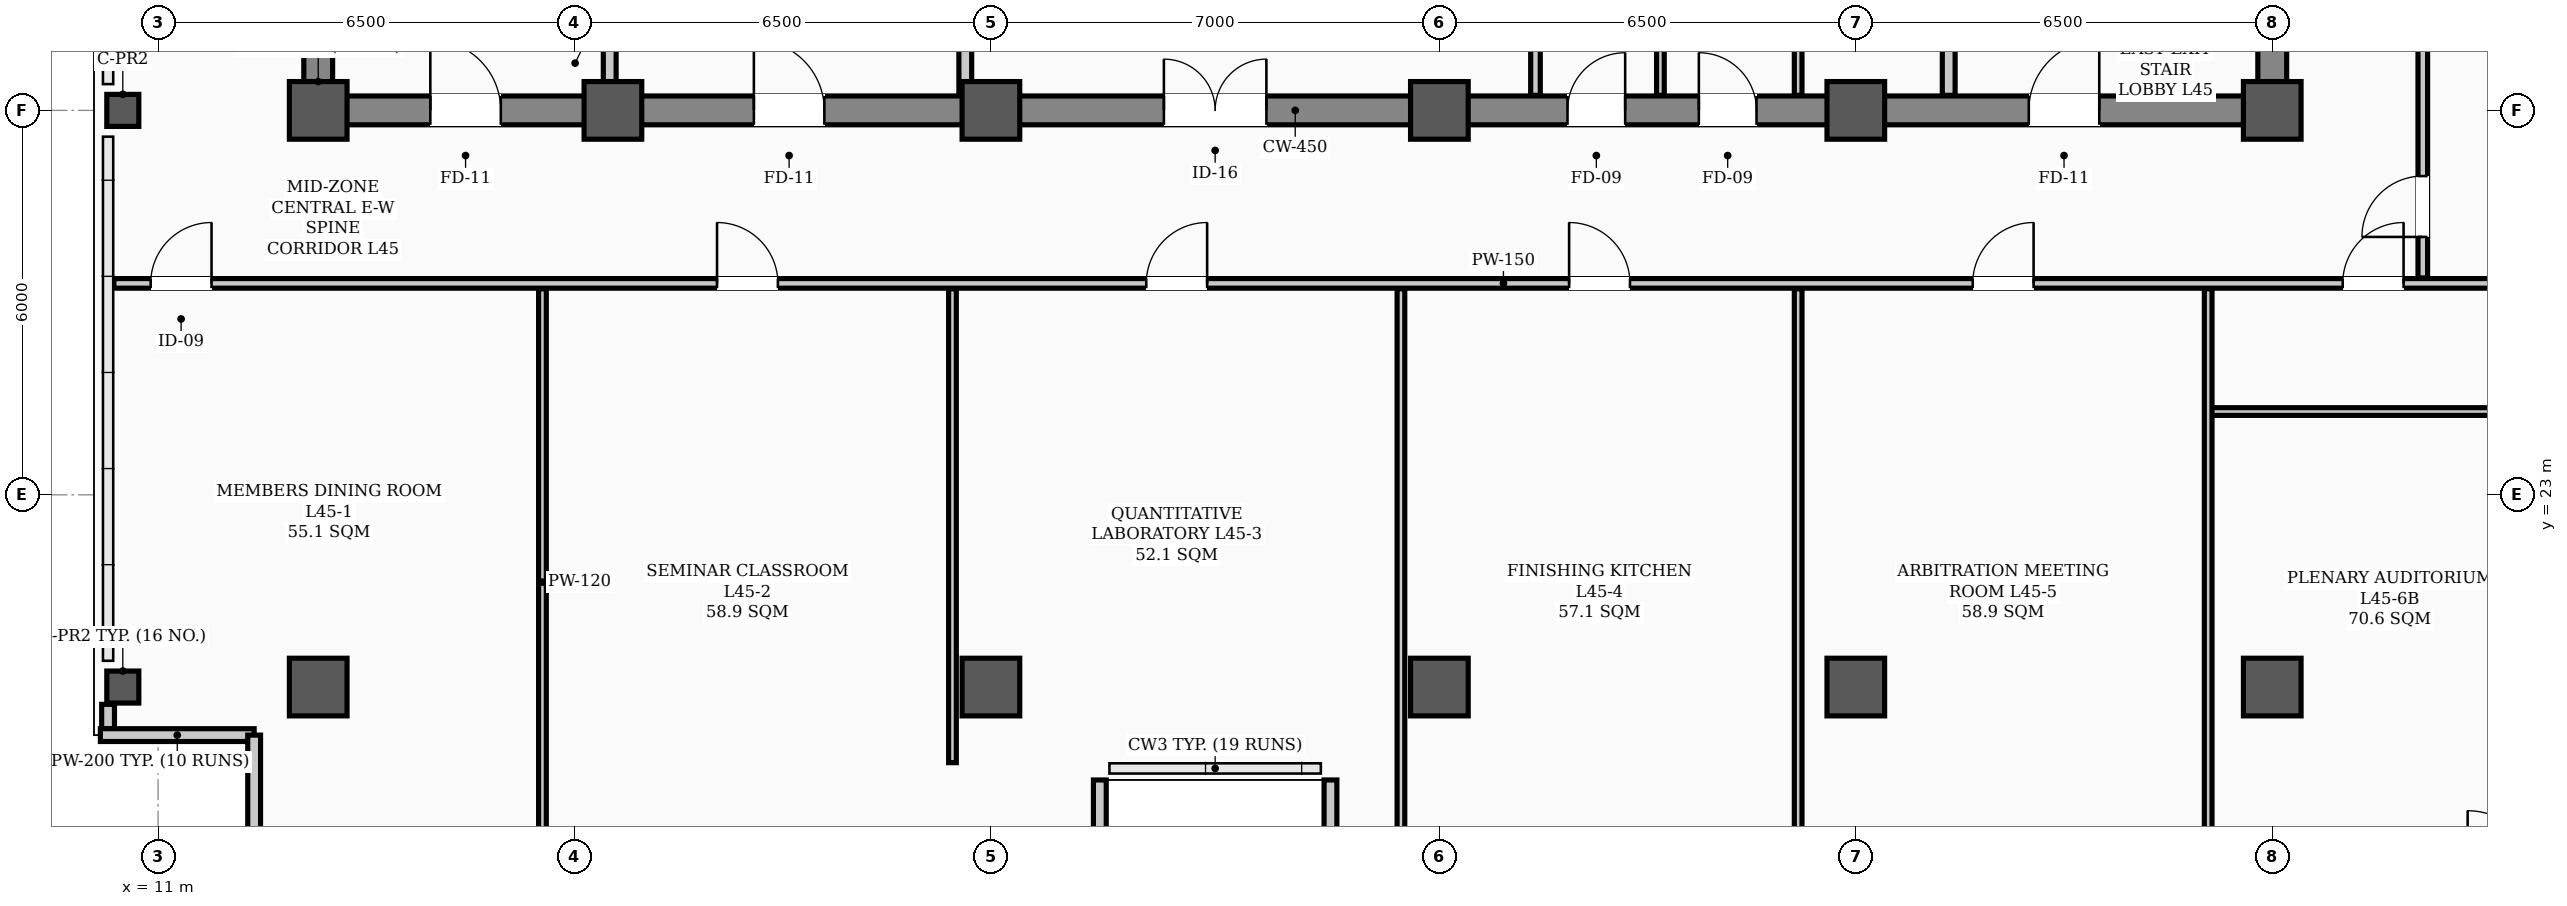
"""IFC4 building model, lengths in metres.
Left out: names, types, materials, properties, quantities, classifications, styles, units other than length and angle.
Written with IfcOpenShell. Run it as: python <this file> out.ifc"""

import sys

from ifc_helpers import new_model, si_unit, direction, frame, frame_2d, origin, origin_2d, place, context, subcontext, project, spatial, rectangle, hollow_rectangle, extrude, element, fill, save


model = new_model("IFC4")
c1 = context("Model", 3, precision=1e-05, world=origin(), true_north=direction((0.0, 1.0)))
c2 = subcontext(c1, "Body", "Model", "MODEL_VIEW")
j1 = project(units=[si_unit("LENGTHUNIT", "METRE"), si_unit("PLANEANGLEUNIT", "RADIAN")], contexts=[c1])
p1 = place(None, origin())
s1 = spatial("IfcSite", under=j1, at=p1, CompositionType="ELEMENT")
p2 = place(p1, origin())
s2 = spatial("IfcBuilding", under=s1, at=p2, CompositionType="ELEMENT")
p3 = place(p2, frame((0.0, 0.0, 181.2)))
s3 = spatial("IfcBuildingStorey", under=s2, at=p3, CompositionType="ELEMENT", Elevation=181.2)
for number, where, z_axis, x_axis in (
    (1, (13.5, 29.0, 0.0), (0.0, 0.0, 1.0), (1.0, 0.0, 0.0)),
    (2, (18.1, 29.0, 0.0), (0.0, 0.0, 1.0), (1.0, 0.0, 0.0)),
    (3, (24.0, 29.0, 0.0), (0.0, 0.0, 1.0), (1.0, 0.0, 0.0)),
    (4, (31.0, 29.0, 0.0), (0.0, 0.0, 1.0), (1.0, 0.0, 0.0)),
    (5, (37.5, 29.0, 0.0), (0.0, 0.0, 1.0), (1.0, 0.0, 0.0)),
    (6, (44.0, 29.0, 0.0), (0.0, 0.0, 1.0), (1.0, 0.0, 0.0)),
    (7, (13.5, 20.0, 0.0), (0.0, 0.0, 1.0), (1.0, 0.0, 0.0)),
    (8, (24.0, 20.0, 0.0), (0.0, 0.0, 1.0), (1.0, 0.0, 0.0)),
    (9, (31.0, 20.0, 0.0), (0.0, 0.0, 1.0), (1.0, 0.0, 0.0)),
    (10, (37.5, 20.0, 0.0), (0.0, 0.0, 1.0), (1.0, 0.0, 0.0)),
    (11, (44.0, 20.0, 0.0), (0.0, 0.0, 1.0), (1.0, 0.0, 0.0)),
):
    element("IfcColumn", number, at=place(p3, frame(where, z_axis=z_axis, x_axis=x_axis)), inside=s3, PredefinedType="COLUMN", context=c2, shape_type="SweptSolid", body=[
        extrude(hollow_rectangle(XDim=0.9, YDim=0.9, WallThickness=0.035, InnerFilletRadius=0.017, OuterFilletRadius=0.052, at=origin_2d()), origin(), (0.0, 0.0, 1.0), 3.9),
    ])
for number, where, z_axis, x_axis in (
    (12, (10.45, 20.0, 0.0), (0.0, 0.0, 1.0), (1.0, 0.0, 0.0)),
    (13, (10.45, 29.0, 0.0), (0.0, 0.0, 1.0), (1.0, 0.0, 0.0)),
):
    element("IfcColumn", number, at=place(p3, frame(where, z_axis=z_axis, x_axis=x_axis)), inside=s3, PredefinedType="COLUMN", context=c2, shape_type="SweptSolid", body=[
        extrude(hollow_rectangle(XDim=0.5, YDim=0.5, WallThickness=0.024, InnerFilletRadius=0.012, OuterFilletRadius=0.036, at=origin_2d()), origin(), (0.0, 0.0, 1.0), 3.9),
    ])
p4 = place(p3, frame((10.22, 19.35, 0.0), z_axis=(0.0, 0.0, 1.0), x_axis=(0.0, 1.0, 0.0)))
e14 = element("IfcWall", 14, at=p4, inside=s3, PredefinedType="PARAPET", context=c2, shape_type="SweptSolid", body=[
    extrude(rectangle(XDim=0.38, YDim=0.2, at=frame_2d((0.19, 0.0))), origin(), (0.0, 0.0, 1.0), 1.2),
])
for number, where, z_axis, x_axis in (
    (15, (10.1, 19.25, 0.0), (0.0, 0.0, 1.0), (1.0, 0.0, 0.0)),
    (16, (12.5, 19.25, 0.0), (0.0, 0.0, 1.0), (0.0, -1.0, 0.0)),
):
    element("IfcWall", number, at=place(p3, frame(where, z_axis=z_axis, x_axis=x_axis)), inside=s3, PredefinedType="PARAPET", context=c2, shape_type="SweptSolid", body=[
        extrude(rectangle(XDim=2.4, YDim=0.2, at=frame_2d((1.2, 0.0))), origin(), (0.0, 0.0, 1.0), 1.2),
    ])
for number, where, z_axis, x_axis in (
    (17, (25.7, 16.85, 0.0), (0.0, 0.0, 1.0), (0.0, 1.0, 0.0)),
    (18, (29.3, 18.55, 0.0), (0.0, 0.0, 1.0), (0.0, -1.0, 0.0)),
):
    element("IfcWall", number, at=place(p3, frame(where, z_axis=z_axis, x_axis=x_axis)), inside=s3, PredefinedType="PARAPET", context=c2, shape_type="SweptSolid", body=[
        extrude(rectangle(XDim=1.7, YDim=0.2, at=frame_2d((0.85, 0.0))), origin(), (0.0, 0.0, 1.0), 1.2),
    ])
p5 = place(p3, frame((13.5, 29.0, 0.0), z_axis=(0.0, 0.0, 1.0), x_axis=(1.0, 0.0, 0.0)))
e19 = element("IfcWall", 19, at=p5, inside=s3, PredefinedType="SHEAR", context=c2, shape_type="SweptSolid", body=[
    extrude(rectangle(XDim=30.5, YDim=0.45, at=frame_2d((15.25, 0.0))), origin(), (0.0, 0.0, 1.0), 3.72),
])
p6 = place(p5, frame((1.75, 0.0, 0.0)))
e20 = element("IfcOpeningElement", 20, at=p6, cuts=e19, PredefinedType="OPENING", context=c2, shape_type="SweptSolid", body=[
    extrude(rectangle(XDim=1.1, YDim=2.08, at=frame_2d((0.55, 1.04))), frame((0.0, 0.235, 0.0), z_axis=(0.0, -1.0, 0.0), x_axis=(1.0, 0.0, 0.0)), (0.0, 0.0, 1.0), 0.47),
])
p7 = place(p5, frame((26.7, 0.0, 0.0)))
e21 = element("IfcOpeningElement", 21, at=p7, cuts=e19, PredefinedType="OPENING", context=c2, shape_type="SweptSolid", body=[
    extrude(rectangle(XDim=1.1, YDim=2.08, at=frame_2d((0.55, 1.04))), frame((0.0, 0.235, 0.0), z_axis=(0.0, -1.0, 0.0), x_axis=(1.0, 0.0, 0.0)), (0.0, 0.0, 1.0), 0.47),
])
p8 = place(p5, frame((6.8, 0.0, 0.0)))
e22 = element("IfcOpeningElement", 22, at=p8, cuts=e19, PredefinedType="OPENING", context=c2, shape_type="SweptSolid", body=[
    extrude(rectangle(XDim=1.1, YDim=2.08, at=frame_2d((0.55, 1.04))), frame((0.0, 0.235, 0.0), z_axis=(0.0, -1.0, 0.0), x_axis=(1.0, 0.0, 0.0)), (0.0, 0.0, 1.0), 0.47),
])
p9 = place(p5, frame((13.2, 0.0, 0.0)))
e23 = element("IfcOpeningElement", 23, at=p9, cuts=e19, PredefinedType="OPENING", context=c2, shape_type="SweptSolid", body=[
    extrude(rectangle(XDim=1.6, YDim=2.08, at=frame_2d((0.8, 1.04))), frame((0.0, 0.235, 0.0), z_axis=(0.0, -1.0, 0.0), x_axis=(1.0, 0.0, 0.0)), (0.0, 0.0, 1.0), 0.47),
])
p10 = place(p5, frame((19.5, 0.0, 0.0)))
e24 = element("IfcOpeningElement", 24, at=p10, cuts=e19, PredefinedType="OPENING", context=c2, shape_type="SweptSolid", body=[
    extrude(rectangle(XDim=0.9, YDim=2.08, at=frame_2d((0.45, 1.04))), frame((0.0, 0.235, 0.0), z_axis=(0.0, -1.0, 0.0), x_axis=(1.0, 0.0, 0.0)), (0.0, 0.0, 1.0), 0.47),
])
p11 = place(p5, frame((21.55, 0.0, 0.0)))
e25 = element("IfcOpeningElement", 25, at=p11, cuts=e19, PredefinedType="OPENING", context=c2, shape_type="SweptSolid", body=[
    extrude(rectangle(XDim=0.9, YDim=2.08, at=frame_2d((0.45, 1.04))), frame((0.0, 0.235, 0.0), z_axis=(0.0, -1.0, 0.0), x_axis=(1.0, 0.0, 0.0)), (0.0, 0.0, 1.0), 0.47),
])
for number, where, z_axis, x_axis in (
    (26, (13.5, 29.35, 0.0), (0.0, 0.0, 1.0), (0.0, 1.0, 0.0)),
    (27, (44.0, 29.35, 0.0), (0.0, 0.0, 1.0), (0.0, 1.0, 0.0)),
):
    element("IfcWall", number, at=place(p3, frame(where, z_axis=z_axis, x_axis=x_axis)), inside=s3, PredefinedType="SHEAR", context=c2, shape_type="SweptSolid", body=[
        extrude(rectangle(XDim=8.6, YDim=0.45, at=frame_2d((4.3, 0.0))), origin(), (0.0, 0.0, 1.0), 3.72),
    ])
p12 = place(p3, frame((10.31, 26.3, 0.0), z_axis=(0.0, 0.0, 1.0), x_axis=(1.0, 0.0, 0.0)))
e28 = element("IfcWall", 28, at=p12, inside=s3, PredefinedType="PARTITIONING", context=c2, shape_type="SweptSolid", body=[
    extrude(rectangle(XDim=43.38, YDim=0.15, at=frame_2d((21.69, 0.0))), origin(), (0.0, 0.0, 1.0), 3.2),
])
p13 = place(p12, frame((0.575, 0.0, 0.0)))
e29 = element("IfcOpeningElement", 29, at=p13, cuts=e28, PredefinedType="OPENING", context=c2, shape_type="SweptSolid", body=[
    extrude(rectangle(XDim=0.95, YDim=2.08, at=frame_2d((0.475, 1.04))), frame((0.0, 0.085, 0.0), z_axis=(0.0, -1.0, 0.0), x_axis=(1.0, 0.0, 0.0)), (0.0, 0.0, 1.0), 0.17),
])
p14 = place(p12, frame((9.415, 0.0, 0.0)))
e30 = element("IfcOpeningElement", 30, at=p14, cuts=e28, PredefinedType="OPENING", context=c2, shape_type="SweptSolid", body=[
    extrude(rectangle(XDim=0.95, YDim=2.08, at=frame_2d((0.475, 1.04))), frame((0.0, 0.085, 0.0), z_axis=(0.0, -1.0, 0.0), x_axis=(1.0, 0.0, 0.0)), (0.0, 0.0, 1.0), 0.17),
])
p15 = place(p12, frame((16.115, 0.0, 0.0)))
e31 = element("IfcOpeningElement", 31, at=p15, cuts=e28, PredefinedType="OPENING", context=c2, shape_type="SweptSolid", body=[
    extrude(rectangle(XDim=0.95, YDim=2.08, at=frame_2d((0.475, 1.04))), frame((0.0, 0.085, 0.0), z_axis=(0.0, -1.0, 0.0), x_axis=(1.0, 0.0, 0.0)), (0.0, 0.0, 1.0), 0.17),
])
p16 = place(p12, frame((22.715, 0.0, 0.0)))
e32 = element("IfcOpeningElement", 32, at=p16, cuts=e28, PredefinedType="OPENING", context=c2, shape_type="SweptSolid", body=[
    extrude(rectangle(XDim=0.95, YDim=2.08, at=frame_2d((0.475, 1.04))), frame((0.0, 0.085, 0.0), z_axis=(0.0, -1.0, 0.0), x_axis=(1.0, 0.0, 0.0)), (0.0, 0.0, 1.0), 0.17),
])
p17 = place(p12, frame((29.015, 0.0, 0.0)))
e33 = element("IfcOpeningElement", 33, at=p17, cuts=e28, PredefinedType="OPENING", context=c2, shape_type="SweptSolid", body=[
    extrude(rectangle(XDim=0.95, YDim=2.08, at=frame_2d((0.475, 1.04))), frame((0.0, 0.085, 0.0), z_axis=(0.0, -1.0, 0.0), x_axis=(1.0, 0.0, 0.0)), (0.0, 0.0, 1.0), 0.17),
])
p18 = place(p12, frame((34.79, 0.0, 0.0)))
e34 = element("IfcOpeningElement", 34, at=p18, cuts=e28, PredefinedType="OPENING", context=c2, shape_type="SweptSolid", body=[
    extrude(rectangle(XDim=0.95, YDim=2.08, at=frame_2d((0.475, 1.04))), frame((0.0, 0.085, 0.0), z_axis=(0.0, -1.0, 0.0), x_axis=(1.0, 0.0, 0.0)), (0.0, 0.0, 1.0), 0.17),
])
p19 = place(p3, frame((43.0, 24.3, 0.0), z_axis=(0.0, 0.0, 1.0), x_axis=(1.0, 0.0, 0.0)))
e35 = element("IfcWall", 35, at=p19, inside=s3, PredefinedType="PARTITIONING", context=c2, shape_type="SweptSolid", body=[
    extrude(rectangle(XDim=10.69, YDim=0.12, at=frame_2d((5.345, 0.0))), origin(), (0.0, 0.0, 1.0), 3.2),
])
p20 = place(p19, frame((4.87, 0.0, 0.0)))
e36 = element("IfcOpeningElement", 36, at=p20, cuts=e35, PredefinedType="OPENING", context=c2, shape_type="SweptSolid", body=[
    extrude(rectangle(XDim=0.95, YDim=2.08, at=frame_2d((0.475, 1.04))), frame((0.0, 0.07, 0.0), z_axis=(0.0, -1.0, 0.0), x_axis=(1.0, 0.0, 0.0)), (0.0, 0.0, 1.0), 0.14),
])
for number, where, z_axis, x_axis in (
    (37, (18.05, 29.235, 0.0), (0.0, 0.0, 1.0), (0.0, 1.0, 0.0)),
    (38, (38.95, 29.235, 0.0), (0.0, 0.0, 1.0), (0.0, 1.0, 0.0)),
):
    element("IfcWall", number, at=place(p3, frame(where, z_axis=z_axis, x_axis=x_axis)), inside=s3, PredefinedType="STANDARD", context=c2, shape_type="SweptSolid", body=[
        extrude(rectangle(XDim=1.065, YDim=0.2, at=frame_2d((0.532, 0.0))), origin(), (0.0, 0.0, 1.0), 3.35),
    ])
p21 = place(p3, frame((23.6, 29.235, 0.0), z_axis=(0.0, 0.0, 1.0), x_axis=(0.0, 1.0, 0.0)))
e39 = element("IfcWall", 39, at=p21, inside=s3, PredefinedType="STANDARD", context=c2, shape_type="SweptSolid", body=[
    extrude(rectangle(XDim=5.465, YDim=0.2, at=frame_2d((2.732, 0.0))), origin(), (0.0, 0.0, 1.0), 3.2),
])
p22 = place(p3, frame((32.5, 29.235, 0.0), z_axis=(0.0, 0.0, 1.0), x_axis=(0.0, 1.0, 0.0)))
e40 = element("IfcWall", 40, at=p22, inside=s3, PredefinedType="PARTITIONING", context=c2, shape_type="SweptSolid", body=[
    extrude(rectangle(XDim=2.53, YDim=0.15, at=frame_2d((1.265, 0.0))), origin(), (0.0, 0.0, 1.0), 3.35),
])
for number, where, z_axis, x_axis in (
    (41, (36.6, 29.235, 0.0), (0.0, 0.0, 1.0), (0.0, 1.0, 0.0)),
    (42, (34.45, 29.235, 0.0), (0.0, 0.0, 1.0), (0.0, 1.0, 0.0)),
):
    element("IfcWall", number, at=place(p3, frame(where, z_axis=z_axis, x_axis=x_axis)), inside=s3, PredefinedType="PARTITIONING", context=c2, shape_type="SweptSolid", body=[
        extrude(rectangle(XDim=2.53, YDim=0.12, at=frame_2d((1.265, 0.0))), origin(), (0.0, 0.0, 1.0), 3.35),
    ])
p23 = place(p3, frame((46.35, 26.385, 0.0), z_axis=(0.0, 0.0, 1.0), x_axis=(0.0, 1.0, 0.0)))
e43 = element("IfcWall", 43, at=p23, inside=s3, PredefinedType="PARTITIONING", context=c2, shape_type="SweptSolid", body=[
    extrude(rectangle(XDim=13.58, YDim=0.15, at=frame_2d((6.79, 0.0))), origin(), (0.0, 0.0, 1.0), 3.1),
])
p24 = place(p23, frame((0.64, 0.0, 0.0)))
e44 = element("IfcOpeningElement", 44, at=p24, cuts=e43, PredefinedType="OPENING", context=c2, shape_type="SweptSolid", body=[
    extrude(rectangle(XDim=0.95, YDim=2.08, at=frame_2d((0.475, 1.04))), frame((0.0, 0.085, 0.0), z_axis=(0.0, -1.0, 0.0), x_axis=(1.0, 0.0, 0.0)), (0.0, 0.0, 1.0), 0.17),
])
p25 = place(p23, frame((10.065, 0.0, 0.0)))
e45 = element("IfcOpeningElement", 45, at=p25, cuts=e43, PredefinedType="OPENING", context=c2, shape_type="SweptSolid", body=[
    extrude(rectangle(XDim=0.95, YDim=2.08, at=frame_2d((0.475, 1.04))), frame((0.0, 0.085, 0.0), z_axis=(0.0, -1.0, 0.0), x_axis=(1.0, 0.0, 0.0)), (0.0, 0.0, 1.0), 0.17),
])
p26 = place(p3, frame((17.0, 17.06, 0.0), z_axis=(0.0, 0.0, 1.0), x_axis=(0.0, 1.0, 0.0)))
e46 = element("IfcWall", 46, at=p26, inside=s3, PredefinedType="PARTITIONING", context=c2, shape_type="SweptSolid", body=[
    extrude(rectangle(XDim=9.155, YDim=0.12, at=frame_2d((4.578, 0.0))), origin(), (0.0, 0.0, 1.0), 3.1),
])
p27 = place(p3, frame((23.4, 18.82, 0.0), z_axis=(0.0, 0.0, 1.0), x_axis=(0.0, 1.0, 0.0)))
e47 = element("IfcWall", 47, at=p27, inside=s3, PredefinedType="PARTITIONING", context=c2, shape_type="SweptSolid", body=[
    extrude(rectangle(XDim=7.395, YDim=0.12, at=frame_2d((3.698, 0.0))), origin(), (0.0, 0.0, 1.0), 3.1),
])
for number, where, z_axis, x_axis in (
    (48, (30.4, 17.06, 0.0), (0.0, 0.0, 1.0), (0.0, 1.0, 0.0)),
    (49, (36.6, 17.06, 0.0), (0.0, 0.0, 1.0), (0.0, 1.0, 0.0)),
    (50, (43.0, 17.06, 0.0), (0.0, 0.0, 1.0), (0.0, 1.0, 0.0)),
):
    element("IfcWall", number, at=place(p3, frame(where, z_axis=z_axis, x_axis=x_axis)), inside=s3, PredefinedType="PARTITIONING", context=c2, shape_type="SweptSolid", body=[
        extrude(rectangle(XDim=9.155, YDim=0.12, at=frame_2d((4.578, 0.0))), origin(), (0.0, 0.0, 1.0), 3.1),
    ])
p28 = place(p6, origin())
e51 = element("IfcDoor", 51, at=p28, inside=s3, OperationType="SINGLE_SWING_LEFT", PredefinedType="DOOR", context=c2, shape_type="SweptSolid", body=[
    extrude(rectangle(XDim=1.1, YDim=2.08, at=frame_2d((0.55, 1.04))), frame((0.0, 0.025, 0.0), z_axis=(0.0, -1.0, 0.0), x_axis=(1.0, 0.0, 0.0)), (0.0, 0.0, 1.0), 0.05),
])
fill(e20, e51)
p29 = place(p7, origin())
e52 = element("IfcDoor", 52, at=p29, inside=s3, OperationType="SINGLE_SWING_RIGHT", PredefinedType="DOOR", context=c2, shape_type="SweptSolid", body=[
    extrude(rectangle(XDim=1.1, YDim=2.08, at=frame_2d((0.55, 1.04))), frame((0.0, 0.025, 0.0), z_axis=(0.0, -1.0, 0.0), x_axis=(1.0, 0.0, 0.0)), (0.0, 0.0, 1.0), 0.05),
])
fill(e21, e52)
p30 = place(p8, origin())
e53 = element("IfcDoor", 53, at=p30, inside=s3, OperationType="SINGLE_SWING_LEFT", PredefinedType="DOOR", context=c2, shape_type="SweptSolid", body=[
    extrude(rectangle(XDim=1.1, YDim=2.08, at=frame_2d((0.55, 1.04))), frame((0.0, 0.025, 0.0), z_axis=(0.0, -1.0, 0.0), x_axis=(1.0, 0.0, 0.0)), (0.0, 0.0, 1.0), 0.05),
])
fill(e22, e53)
p31 = place(p9, origin())
e54 = element("IfcDoor", 54, at=p31, inside=s3, OperationType="DOUBLE_DOOR_SINGLE_SWING", PredefinedType="DOOR", context=c2, shape_type="SweptSolid", body=[
    extrude(rectangle(XDim=1.6, YDim=2.08, at=frame_2d((0.8, 1.04))), frame((0.0, 0.025, 0.0), z_axis=(0.0, -1.0, 0.0), x_axis=(1.0, 0.0, 0.0)), (0.0, 0.0, 1.0), 0.05),
])
fill(e23, e54)
p32 = place(p10, origin())
e55 = element("IfcDoor", 55, at=p32, inside=s3, OperationType="SINGLE_SWING_RIGHT", PredefinedType="DOOR", context=c2, shape_type="SweptSolid", body=[
    extrude(rectangle(XDim=0.9, YDim=2.08, at=frame_2d((0.45, 1.04))), frame((0.0, 0.025, 0.0), z_axis=(0.0, -1.0, 0.0), x_axis=(1.0, 0.0, 0.0)), (0.0, 0.0, 1.0), 0.05),
])
fill(e24, e55)
p33 = place(p11, origin())
e56 = element("IfcDoor", 56, at=p33, inside=s3, OperationType="SINGLE_SWING_LEFT", PredefinedType="DOOR", context=c2, shape_type="SweptSolid", body=[
    extrude(rectangle(XDim=0.9, YDim=2.08, at=frame_2d((0.45, 1.04))), frame((0.0, 0.025, 0.0), z_axis=(0.0, -1.0, 0.0), x_axis=(1.0, 0.0, 0.0)), (0.0, 0.0, 1.0), 0.05),
])
fill(e25, e56)
p34 = place(p13, origin())
e57 = element("IfcDoor", 57, at=p34, inside=s3, OperationType="SINGLE_SWING_RIGHT", PredefinedType="DOOR", context=c2, shape_type="SweptSolid", body=[
    extrude(rectangle(XDim=0.95, YDim=2.08, at=frame_2d((0.475, 1.04))), frame((0.0, 0.025, 0.0), z_axis=(0.0, -1.0, 0.0), x_axis=(1.0, 0.0, 0.0)), (0.0, 0.0, 1.0), 0.05),
])
fill(e29, e57)
p35 = place(p14, origin())
e58 = element("IfcDoor", 58, at=p35, inside=s3, OperationType="SINGLE_SWING_LEFT", PredefinedType="DOOR", context=c2, shape_type="SweptSolid", body=[
    extrude(rectangle(XDim=0.95, YDim=2.08, at=frame_2d((0.475, 1.04))), frame((0.0, 0.025, 0.0), z_axis=(0.0, -1.0, 0.0), x_axis=(1.0, 0.0, 0.0)), (0.0, 0.0, 1.0), 0.05),
])
fill(e30, e58)
p36 = place(p15, origin())
e59 = element("IfcDoor", 59, at=p36, inside=s3, OperationType="SINGLE_SWING_RIGHT", PredefinedType="DOOR", context=c2, shape_type="SweptSolid", body=[
    extrude(rectangle(XDim=0.95, YDim=2.08, at=frame_2d((0.475, 1.04))), frame((0.0, 0.025, 0.0), z_axis=(0.0, -1.0, 0.0), x_axis=(1.0, 0.0, 0.0)), (0.0, 0.0, 1.0), 0.05),
])
fill(e31, e59)
p37 = place(p16, origin())
e60 = element("IfcDoor", 60, at=p37, inside=s3, OperationType="SINGLE_SWING_LEFT", PredefinedType="DOOR", context=c2, shape_type="SweptSolid", body=[
    extrude(rectangle(XDim=0.95, YDim=2.08, at=frame_2d((0.475, 1.04))), frame((0.0, 0.025, 0.0), z_axis=(0.0, -1.0, 0.0), x_axis=(1.0, 0.0, 0.0)), (0.0, 0.0, 1.0), 0.05),
])
fill(e32, e60)
p38 = place(p17, origin())
e61 = element("IfcDoor", 61, at=p38, inside=s3, OperationType="SINGLE_SWING_RIGHT", PredefinedType="DOOR", context=c2, shape_type="SweptSolid", body=[
    extrude(rectangle(XDim=0.95, YDim=2.08, at=frame_2d((0.475, 1.04))), frame((0.0, 0.025, 0.0), z_axis=(0.0, -1.0, 0.0), x_axis=(1.0, 0.0, 0.0)), (0.0, 0.0, 1.0), 0.05),
])
fill(e33, e61)
p39 = place(p18, origin())
e62 = element("IfcDoor", 62, at=p39, inside=s3, OperationType="SINGLE_SWING_RIGHT", PredefinedType="DOOR", context=c2, shape_type="SweptSolid", body=[
    extrude(rectangle(XDim=0.95, YDim=2.08, at=frame_2d((0.475, 1.04))), frame((0.0, 0.025, 0.0), z_axis=(0.0, -1.0, 0.0), x_axis=(1.0, 0.0, 0.0)), (0.0, 0.0, 1.0), 0.05),
])
fill(e34, e62)
p40 = place(p24, origin())
e63 = element("IfcDoor", 63, at=p40, inside=s3, OperationType="SINGLE_SWING_LEFT", PredefinedType="DOOR", context=c2, shape_type="SweptSolid", body=[
    extrude(rectangle(XDim=0.95, YDim=2.08, at=frame_2d((0.475, 1.04))), frame((0.0, 0.025, 0.0), z_axis=(0.0, -1.0, 0.0), x_axis=(1.0, 0.0, 0.0)), (0.0, 0.0, 1.0), 0.05),
])
fill(e44, e63)
save(model, sys.argv[1])
